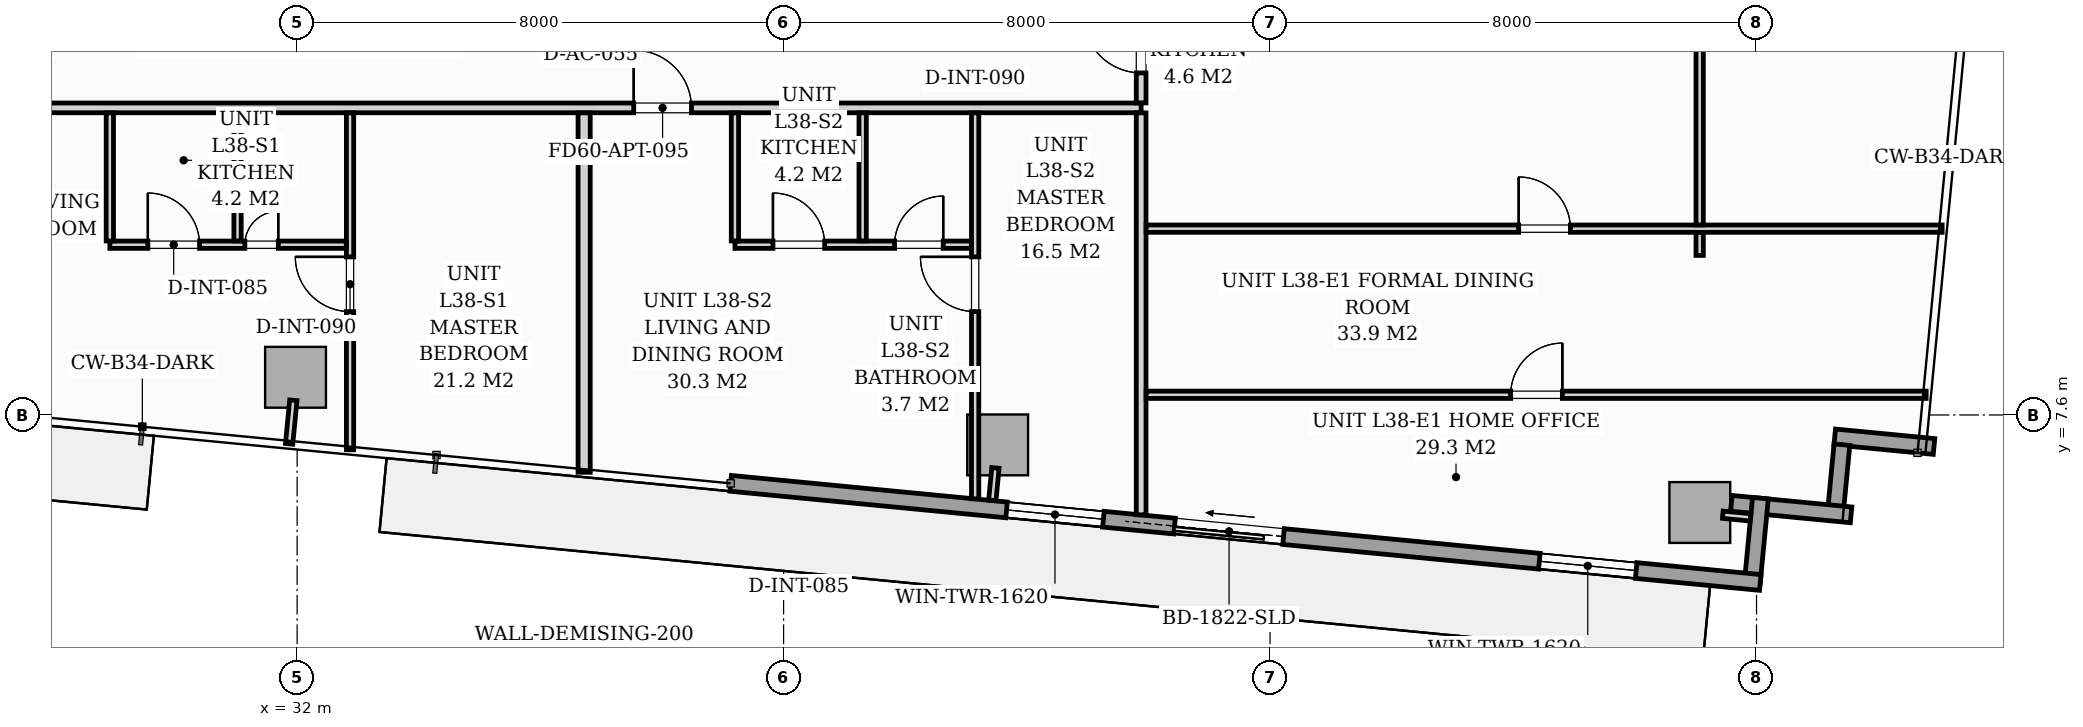
"""IFC4 building model, lengths in metres.
Left out: names, types, materials, properties, quantities, classifications, styles, units other than length and angle.
Written with IfcOpenShell. Run it as: python <this file> out.ifc"""

import sys

from ifc_helpers import new_model, si_unit, direction, frame, frame_2d, origin, origin_2d, place, context, subcontext, project, spatial, rectangle, extrude, source, transform, mapped, element, fill, save


model = new_model("IFC4")
c1 = context("Model", 3, precision=1e-05, world=origin(), true_north=direction((0.0, 1.0)))
c2 = subcontext(c1, "Body", "Model", "MODEL_VIEW")
j1 = project(units=[si_unit("LENGTHUNIT", "METRE"), si_unit("PLANEANGLEUNIT", "RADIAN")], contexts=[c1])
p1 = place(None, origin())
s1 = spatial("IfcSite", under=j1, at=p1, CompositionType="ELEMENT")
p2 = place(p1, origin())
s2 = spatial("IfcBuilding", under=s1, at=p2, CompositionType="ELEMENT")
p3 = place(p2, frame((0.0, 0.0, 134.2)))
s3 = spatial("IfcBuildingStorey", under=s2, at=p3, CompositionType="ELEMENT", Elevation=134.2)
m1 = source(origin(), c2, "Body", "SweptSolid", [
    extrude(rectangle(XDim=1.0, YDim=1.0, at=origin_2d()), origin(), (0.0, 0.0, 1.0), 3.196),
])
for number, where, z_axis, x_axis in (
    (1, (31.974, 8.22, 0.002), (0.0, 0.0, 1.0), (0.995, -0.096, 0.0)),
    (2, (43.521, 7.108, 0.002), (0.0, 0.0, 1.0), (0.995, -0.096, 0.0)),
    (3, (55.067, 5.996, 0.002), (0.0, 0.0, 1.0), (0.995, -0.096, 0.0)),
):
    element("IfcColumn", number, at=place(p3, frame(where, z_axis=z_axis, x_axis=x_axis)), inside=s3, PredefinedType="COLUMN", context=c2, shape_type="MappedRepresentation", body=[
        mapped(m1, transform((0.0, 0.0, 0.0), scale=1.0)),
    ])
p4 = place(p3, frame((58.919, 7.082, 0.0), z_axis=(0.0, 0.0, 1.0), x_axis=(-0.995393194909, 0.095876939504, 0.0)))
e4 = element("IfcWall", 4, at=p4, inside=s3, PredefinedType="STANDARD", context=c2, shape_type="SweptSolid", body=[
    extrude(rectangle(XDim=1.64, YDim=0.26, at=frame_2d((0.82, 0.0))), origin(), (0.0, 0.0, 1.0), 2.94),
])
p5 = place(p3, frame((57.405, 7.112, 0.0), z_axis=(0.0, 0.0, 1.0), x_axis=(-0.095971333708, -0.995384098279, 0.0)))
e5 = element("IfcWall", 5, at=p5, inside=s3, PredefinedType="STANDARD", context=c2, shape_type="SweptSolid", body=[
    extrude(rectangle(XDim=1.15, YDim=0.26, at=frame_2d((0.575, 0.0))), origin(), (0.0, 0.0, 1.0), 2.94),
])
p6 = place(p3, frame((57.555, 5.958, 0.0), z_axis=(0.0, 0.0, 1.0), x_axis=(-0.995401789159, 0.095787672171, 0.0)))
e6 = element("IfcWall", 6, at=p6, inside=s3, PredefinedType="STANDARD", context=c2, shape_type="SweptSolid", body=[
    extrude(rectangle(XDim=1.978, YDim=0.26, at=frame_2d((0.989, 0.0))), origin(), (0.0, 0.0, 1.0), 2.94),
])
p7 = place(p3, frame((56.064, 6.232, 0.0), z_axis=(0.0, 0.0, 1.0), x_axis=(-0.09589913835, -0.995391056452, 0.0)))
e7 = element("IfcWall", 7, at=p7, inside=s3, PredefinedType="STANDARD", context=c2, shape_type="SweptSolid", body=[
    extrude(rectangle(XDim=1.395, YDim=0.26, at=frame_2d((0.698, 0.0))), origin(), (0.0, 0.0, 1.0), 2.94),
])
p8 = place(p3, frame((56.061, 4.845, 0.0), z_axis=(0.0, 0.0, 1.0), x_axis=(-0.995395976631, 0.095848055311, 0.0)))
e8 = element("IfcWall", 8, at=p8, inside=s3, PredefinedType="STANDARD", context=c2, shape_type="SweptSolid", body=[
    extrude(rectangle(XDim=17.01, YDim=0.26, at=frame_2d((8.505, 0.0))), origin(), (0.0, 0.0, 1.0), 2.94),
])
p9 = place(p8, frame((7.876, 0.0, 0.0)))
e9 = element("IfcOpeningElement", 9, at=p9, cuts=e8, PredefinedType="OPENING", context=c2, shape_type="SweptSolid", body=[
    extrude(rectangle(XDim=1.8, YDim=2.06, at=frame_2d((0.9, 1.03))), frame((0.0, 0.14, 0.0), z_axis=(0.0, -1.0, 0.0), x_axis=(1.0, 0.0, 0.0)), (0.0, 0.0, 1.0), 0.28),
])
p10 = place(p8, frame((2.05, 0.0, 0.65)))
e10 = element("IfcOpeningElement", 10, at=p10, cuts=e8, PredefinedType="OPENING", context=c2, shape_type="SweptSolid", body=[
    extrude(rectangle(XDim=1.6, YDim=1.5, at=frame_2d((0.8, 0.75))), frame((0.0, 0.14, 0.0), z_axis=(0.0, -1.0, 0.0), x_axis=(1.0, 0.0, 0.0)), (0.0, 0.0, 1.0), 0.28),
])
p11 = place(p8, frame((10.852, 0.0, 0.75)))
e11 = element("IfcOpeningElement", 11, at=p11, cuts=e8, PredefinedType="OPENING", context=c2, shape_type="SweptSolid", body=[
    extrude(rectangle(XDim=1.6, YDim=1.5, at=frame_2d((0.8, 0.75))), frame((0.0, 0.14, 0.0), z_axis=(0.0, -1.0, 0.0), x_axis=(1.0, 0.0, 0.0)), (0.0, 0.0, 1.0), 0.28),
])
p12 = place(p3, frame((22.05, 12.65, 0.0), z_axis=(0.0, 0.0, 1.0), x_axis=(1.0, 0.0, 0.0)))
e12 = element("IfcWall", 12, at=p12, inside=s3, PredefinedType="PARTITIONING", context=c2, shape_type="SweptSolid", body=[
    extrude(rectangle(XDim=23.83, YDim=0.16, at=frame_2d((11.915, 0.0))), origin(), (0.0, 0.0, 1.0), 2.94),
])
p13 = place(p12, frame((3.0, 0.0, 0.0)))
e13 = element("IfcOpeningElement", 13, at=p13, cuts=e12, PredefinedType="OPENING", context=c2, shape_type="SweptSolid", body=[
    extrude(rectangle(XDim=0.95, YDim=2.06, at=frame_2d((0.475, 1.03))), frame((0.0, 0.09, 0.0), z_axis=(0.0, -1.0, 0.0), x_axis=(1.0, 0.0, 0.0)), (0.0, 0.0, 1.0), 0.18),
])
p14 = place(p12, frame((15.485, 0.0, 0.0)))
e14 = element("IfcOpeningElement", 14, at=p14, cuts=e12, PredefinedType="OPENING", context=c2, shape_type="SweptSolid", body=[
    extrude(rectangle(XDim=0.95, YDim=2.06, at=frame_2d((0.475, 1.03))), frame((0.0, 0.09, 0.0), z_axis=(0.0, -1.0, 0.0), x_axis=(1.0, 0.0, 0.0)), (0.0, 0.0, 1.0), 0.18),
])
p15 = place(p3, frame((45.88, 5.958, 0.0), z_axis=(0.0, 0.0, 1.0), x_axis=(0.0, 1.0, 0.0)))
e15 = element("IfcWall", 15, at=p15, inside=s3, PredefinedType="PARTITIONING", context=c2, shape_type="SweptSolid", body=[
    extrude(rectangle(XDim=6.61, YDim=0.16, at=frame_2d((3.305, 0.0))), origin(), (0.0, 0.0, 1.0), 2.94),
])
p16 = place(p3, frame((45.88, 12.732, 0.0), z_axis=(0.0, 0.0, 1.0), x_axis=(0.0, 1.0, 0.0)))
e16 = element("IfcWall", 16, at=p16, inside=s3, PredefinedType="PARTITIONING", context=c2, shape_type="SweptSolid", body=[
    extrude(rectangle(XDim=4.366, YDim=0.16, at=frame_2d((2.183, 0.0))), origin(), (0.0, 0.0, 1.0), 2.94),
])
p17 = place(p16, frame((0.493, 0.0, 0.0)))
e17 = element("IfcOpeningElement", 17, at=p17, cuts=e16, PredefinedType="OPENING", context=c2, shape_type="SweptSolid", body=[
    extrude(rectangle(XDim=0.95, YDim=2.06, at=frame_2d((0.475, 1.03))), frame((0.0, 0.09, 0.0), z_axis=(0.0, -1.0, 0.0), x_axis=(1.0, 0.0, 0.0)), (0.0, 0.0, 1.0), 0.18),
])
p18 = place(p3, frame((32.87, 7.028, 0.0), z_axis=(0.0, 0.0, 1.0), x_axis=(0.0, 1.0, 0.0)))
e18 = element("IfcWall", 18, at=p18, inside=s3, PredefinedType="PARTITIONING", context=c2, shape_type="SweptSolid", body=[
    extrude(rectangle(XDim=5.54, YDim=0.12, at=frame_2d((2.77, 0.0))), origin(), (0.0, 0.0, 1.0), 2.94),
])
p19 = place(p18, frame((2.272, 0.0, 0.0)))
e19 = element("IfcOpeningElement", 19, at=p19, cuts=e18, PredefinedType="OPENING", context=c2, shape_type="SweptSolid", body=[
    extrude(rectangle(XDim=0.9, YDim=2.05, at=frame_2d((0.45, 1.025))), frame((0.0, 0.07, 0.0), z_axis=(0.0, -1.0, 0.0), x_axis=(1.0, 0.0, 0.0)), (0.0, 0.0, 1.0), 0.14),
])
p20 = place(p3, frame((28.92, 10.4, 0.0), z_axis=(0.0, 0.0, 1.0), x_axis=(1.0, 0.0, 0.0)))
e20 = element("IfcWall", 20, at=p20, inside=s3, PredefinedType="PARTITIONING", context=c2, shape_type="SweptSolid", body=[
    extrude(rectangle(XDim=3.888, YDim=0.12, at=frame_2d((1.944, 0.0))), origin(), (0.0, 0.0, 1.0), 2.94),
])
p21 = place(p20, frame((0.625, 0.0, 0.0)))
e21 = element("IfcOpeningElement", 21, at=p21, cuts=e20, PredefinedType="OPENING", context=c2, shape_type="SweptSolid", body=[
    extrude(rectangle(XDim=0.85, YDim=2.05, at=frame_2d((0.425, 1.025))), frame((0.0, 0.07, 0.0), z_axis=(0.0, -1.0, 0.0), x_axis=(1.0, 0.0, 0.0)), (0.0, 0.0, 1.0), 0.14),
])
p22 = place(p20, frame((2.22, 0.0, 0.0)))
e22 = element("IfcOpeningElement", 22, at=p22, cuts=e20, PredefinedType="OPENING", context=c2, shape_type="SweptSolid", body=[
    extrude(rectangle(XDim=0.55, YDim=2.0, at=frame_2d((0.275, 1.0))), frame((0.0, 0.07, 0.0), z_axis=(0.0, -1.0, 0.0), x_axis=(1.0, 0.0, 0.0)), (0.0, 0.0, 1.0), 0.14),
])
for number, where, z_axis, x_axis in (
    (23, (31.02, 10.462, 0.0), (0.0, 0.0, 1.0), (0.0, 1.0, 0.0)),
    (24, (28.92, 10.462, 0.0), (0.0, 0.0, 1.0), (0.0, 1.0, 0.0)),
):
    element("IfcWall", number, at=place(p3, frame(where, z_axis=z_axis, x_axis=x_axis)), inside=s3, PredefinedType="PARTITIONING", context=c2, shape_type="SweptSolid", body=[
        extrude(rectangle(XDim=2.106, YDim=0.12, at=frame_2d((1.053, 0.0))), origin(), (0.0, 0.0, 1.0), 2.94),
    ])
p23 = place(p3, frame((36.72, 6.658, 0.0), z_axis=(0.0, 0.0, 1.0), x_axis=(0.0, 1.0, 0.0)))
e25 = element("IfcWall", 25, at=p23, inside=s3, PredefinedType="PARTITIONING", context=c2, shape_type="SweptSolid", body=[
    extrude(rectangle(XDim=5.91, YDim=0.2, at=frame_2d((2.955, 0.0))), origin(), (0.0, 0.0, 1.0), 2.94),
])
p24 = place(p3, frame((43.15, 6.221, 0.0), z_axis=(0.0, 0.0, 1.0), x_axis=(0.0, 1.0, 0.0)))
e26 = element("IfcWall", 26, at=p24, inside=s3, PredefinedType="PARTITIONING", context=c2, shape_type="SweptSolid", body=[
    extrude(rectangle(XDim=6.347, YDim=0.12, at=frame_2d((3.173, 0.0))), origin(), (0.0, 0.0, 1.0), 2.94),
])
p25 = place(p24, frame((3.079, 0.0, 0.0)))
e27 = element("IfcOpeningElement", 27, at=p25, cuts=e26, PredefinedType="OPENING", context=c2, shape_type="SweptSolid", body=[
    extrude(rectangle(XDim=0.9, YDim=2.05, at=frame_2d((0.45, 1.025))), frame((0.0, 0.07, 0.0), z_axis=(0.0, -1.0, 0.0), x_axis=(1.0, 0.0, 0.0)), (0.0, 0.0, 1.0), 0.14),
])
p26 = place(p3, frame((39.2, 10.4, 0.0), z_axis=(0.0, 0.0, 1.0), x_axis=(1.0, 0.0, 0.0)))
e28 = element("IfcWall", 28, at=p26, inside=s3, PredefinedType="PARTITIONING", context=c2, shape_type="SweptSolid", body=[
    extrude(rectangle(XDim=3.888, YDim=0.12, at=frame_2d((1.944, 0.0))), origin(), (0.0, 0.0, 1.0), 2.94),
])
p27 = place(p26, frame((0.625, 0.0, 0.0)))
e29 = element("IfcOpeningElement", 29, at=p27, cuts=e28, PredefinedType="OPENING", context=c2, shape_type="SweptSolid", body=[
    extrude(rectangle(XDim=0.85, YDim=2.05, at=frame_2d((0.425, 1.025))), frame((0.0, 0.07, 0.0), z_axis=(0.0, -1.0, 0.0), x_axis=(1.0, 0.0, 0.0)), (0.0, 0.0, 1.0), 0.14),
])
p28 = place(p26, frame((2.625, 0.0, 0.0)))
e30 = element("IfcOpeningElement", 30, at=p28, cuts=e28, PredefinedType="OPENING", context=c2, shape_type="SweptSolid", body=[
    extrude(rectangle(XDim=0.8, YDim=2.02, at=frame_2d((0.4, 1.01))), frame((0.0, 0.07, 0.0), z_axis=(0.0, -1.0, 0.0), x_axis=(1.0, 0.0, 0.0)), (0.0, 0.0, 1.0), 0.14),
])
for number, where, z_axis, x_axis in (
    (31, (41.3, 10.462, 0.0), (0.0, 0.0, 1.0), (0.0, 1.0, 0.0)),
    (32, (39.2, 10.462, 0.0), (0.0, 0.0, 1.0), (0.0, 1.0, 0.0)),
):
    element("IfcWall", number, at=place(p3, frame(where, z_axis=z_axis, x_axis=x_axis)), inside=s3, PredefinedType="PARTITIONING", context=c2, shape_type="SweptSolid", body=[
        extrude(rectangle(XDim=2.106, YDim=0.12, at=frame_2d((1.053, 0.0))), origin(), (0.0, 0.0, 1.0), 2.94),
    ])
p29 = place(p3, frame((45.962, 7.932, 0.0), z_axis=(0.0, 0.0, 1.0), x_axis=(1.0, 0.0, 0.0)))
e33 = element("IfcWall", 33, at=p29, inside=s3, PredefinedType="PARTITIONING", context=c2, shape_type="SweptSolid", body=[
    extrude(rectangle(XDim=12.828, YDim=0.12, at=frame_2d((6.414, 0.0))), origin(), (0.0, 0.0, 1.0), 2.94),
])
p30 = place(p29, frame((5.995, 0.0, 0.0)))
e34 = element("IfcOpeningElement", 34, at=p30, cuts=e33, PredefinedType="OPENING", context=c2, shape_type="SweptSolid", body=[
    extrude(rectangle(XDim=0.85, YDim=2.05, at=frame_2d((0.425, 1.025))), frame((0.0, 0.07, 0.0), z_axis=(0.0, -1.0, 0.0), x_axis=(1.0, 0.0, 0.0)), (0.0, 0.0, 1.0), 0.14),
])
p31 = place(p3, frame((45.962, 10.664, 0.0), z_axis=(0.0, 0.0, 1.0), x_axis=(1.0, 0.0, 0.0)))
e35 = element("IfcWall", 35, at=p31, inside=s3, PredefinedType="PARTITIONING", context=c2, shape_type="SweptSolid", body=[
    extrude(rectangle(XDim=13.091, YDim=0.12, at=frame_2d((6.545, 0.0))), origin(), (0.0, 0.0, 1.0), 2.94),
])
p32 = place(p31, frame((6.127, 0.0, 0.0)))
e36 = element("IfcOpeningElement", 36, at=p32, cuts=e35, PredefinedType="OPENING", context=c2, shape_type="SweptSolid", body=[
    extrude(rectangle(XDim=0.85, YDim=2.05, at=frame_2d((0.425, 1.025))), frame((0.0, 0.07, 0.0), z_axis=(0.0, -1.0, 0.0), x_axis=(1.0, 0.0, 0.0)), (0.0, 0.0, 1.0), 0.14),
])
p33 = place(p3, frame((55.065, 10.224, 0.0), z_axis=(0.0, 0.0, 1.0), x_axis=(0.0, 1.0, 0.0)))
e37 = element("IfcWall", 37, at=p33, inside=s3, PredefinedType="PARTITIONING", context=c2, shape_type="SweptSolid", body=[
    extrude(rectangle(XDim=0.378, YDim=0.12, at=frame_2d((0.189, 0.0))), origin(), (0.0, 0.0, 1.0), 2.94),
])
p34 = place(p3, frame((55.065, 10.726, 0.0), z_axis=(0.0, 0.0, 1.0), x_axis=(0.0, 1.0, 0.0)))
e38 = element("IfcWall", 38, at=p34, inside=s3, PredefinedType="PARTITIONING", context=c2, shape_type="SweptSolid", body=[
    extrude(rectangle(XDim=9.348, YDim=0.12, at=frame_2d((4.674, 0.0))), origin(), (0.0, 0.0, 1.0), 2.94),
])
p35 = place(p34, frame((4.249, 0.0, 0.0)))
e39 = element("IfcOpeningElement", 39, at=p35, cuts=e38, PredefinedType="OPENING", context=c2, shape_type="SweptSolid", body=[
    extrude(rectangle(XDim=0.85, YDim=2.05, at=frame_2d((0.425, 1.025))), frame((0.0, 0.07, 0.0), z_axis=(0.0, -1.0, 0.0), x_axis=(1.0, 0.0, 0.0)), (0.0, 0.0, 1.0), 0.14),
])
p36 = place(p3, frame((31.938, 7.841, 0.0), z_axis=(0.0, 0.0, 1.0), x_axis=(-0.095977354523, -0.995383517755, 0.0)))
e40 = element("IfcWall", 40, at=p36, inside=s3, PredefinedType="PARTITIONING", context=c2, shape_type="SweptSolid", body=[
    extrude(rectangle(XDim=0.72, YDim=0.12, at=frame_2d((0.36, 0.0))), origin(), (0.0, 0.0, 1.0), 2.94),
])
p37 = place(p3, frame((43.484, 6.729, 0.0), z_axis=(0.0, 0.0, 1.0), x_axis=(-0.095772948675, -0.995403205893, 0.0)))
e41 = element("IfcWall", 41, at=p37, inside=s3, PredefinedType="PARTITIONING", context=c2, shape_type="SweptSolid", body=[
    extrude(rectangle(XDim=0.538, YDim=0.12, at=frame_2d((0.269, 0.0))), origin(), (0.0, 0.0, 1.0), 2.94),
])
p38 = place(p3, frame((55.445, 5.96, 0.0), z_axis=(0.0, 0.0, 1.0), x_axis=(0.995384576284, -0.09596637586, 0.0)))
e42 = element("IfcWall", 42, at=p38, inside=s3, PredefinedType="PARTITIONING", context=c2, shape_type="SweptSolid", body=[
    extrude(rectangle(XDim=0.458, YDim=0.12, at=frame_2d((0.229, 0.0))), origin(), (0.0, 0.0, 1.0), 2.94),
])
m2 = source(origin(), c2, "Body", "SweptSolid", [
    extrude(rectangle(XDim=1.8, YDim=2.06, at=frame_2d((0.9, 1.03))), frame((0.0, 0.025, 0.0), z_axis=(0.0, -1.0, 0.0), x_axis=(1.0, 0.0, 0.0)), (0.0, 0.0, 1.0), 0.05),
])
p39 = place(p9, origin())
e43 = element("IfcDoor", 43, at=p39, inside=s3, OperationType="SLIDING_TO_RIGHT", PredefinedType="DOOR", context=c2, shape_type="MappedRepresentation", body=[
    mapped(m2, transform((0.0, 0.0, 0.0), scale=1.0)),
])
fill(e9, e43)
m3 = source(origin(), c2, "Body", "SweptSolid", [
    extrude(rectangle(XDim=1.6, YDim=1.5, at=frame_2d((0.8, 0.75))), frame((0.0, 0.03, 0.0), z_axis=(0.0, -1.0, 0.0), x_axis=(1.0, 0.0, 0.0)), (0.0, 0.0, 1.0), 0.06),
])
p40 = place(p10, origin())
e44 = element("IfcWindow", 44, at=p40, inside=s3, PartitioningType="SINGLE_PANEL", PredefinedType="WINDOW", context=c2, shape_type="MappedRepresentation", body=[
    mapped(m3, transform((0.0, 0.0, 0.0), scale=1.0)),
])
fill(e10, e44)
p41 = place(p11, origin())
e45 = element("IfcWindow", 45, at=p41, inside=s3, PartitioningType="SINGLE_PANEL", PredefinedType="WINDOW", context=c2, shape_type="MappedRepresentation", body=[
    mapped(m3, transform((0.0, 0.0, 0.0), scale=1.0)),
])
fill(e11, e45)
m4 = source(origin(), c2, "Body", "SweptSolid", [
    extrude(rectangle(XDim=0.9, YDim=2.05, at=frame_2d((0.45, 1.025))), frame((0.0, 0.025, 0.0), z_axis=(0.0, -1.0, 0.0), x_axis=(1.0, 0.0, 0.0)), (0.0, 0.0, 1.0), 0.05),
])
p42 = place(p19, origin())
e46 = element("IfcDoor", 46, at=p42, inside=s3, OperationType="SINGLE_SWING_RIGHT", PredefinedType="DOOR", context=c2, shape_type="MappedRepresentation", body=[
    mapped(m4, transform((0.0, 0.0, 0.0), scale=1.0)),
])
fill(e19, e46)
m5 = source(origin(), c2, "Body", "SweptSolid", [
    extrude(rectangle(XDim=0.85, YDim=2.05, at=frame_2d((0.425, 1.025))), frame((0.0, 0.025, 0.0), z_axis=(0.0, -1.0, 0.0), x_axis=(1.0, 0.0, 0.0)), (0.0, 0.0, 1.0), 0.05),
])
p43 = place(p21, origin())
e47 = element("IfcDoor", 47, at=p43, inside=s3, OperationType="SINGLE_SWING_LEFT", PredefinedType="DOOR", context=c2, shape_type="MappedRepresentation", body=[
    mapped(m5, transform((0.0, 0.0, 0.0), scale=1.0)),
])
fill(e21, e47)
m6 = source(origin(), c2, "Body", "SweptSolid", [
    extrude(rectangle(XDim=0.55, YDim=2.0, at=frame_2d((0.275, 1.0))), frame((0.0, 0.025, 0.0), z_axis=(0.0, -1.0, 0.0), x_axis=(1.0, 0.0, 0.0)), (0.0, 0.0, 1.0), 0.05),
])
p44 = place(p22, origin())
e48 = element("IfcDoor", 48, at=p44, inside=s3, OperationType="SINGLE_SWING_RIGHT", PredefinedType="DOOR", context=c2, shape_type="MappedRepresentation", body=[
    mapped(m6, transform((0.0, 0.0, 0.0), scale=1.0)),
])
fill(e22, e48)
m7 = source(origin(), c2, "Body", "SweptSolid", [
    extrude(rectangle(XDim=0.95, YDim=2.06, at=frame_2d((0.475, 1.03))), frame((0.0, 0.025, 0.0), z_axis=(0.0, -1.0, 0.0), x_axis=(1.0, 0.0, 0.0)), (0.0, 0.0, 1.0), 0.05),
])
p45 = place(p14, origin())
e49 = element("IfcDoor", 49, at=p45, inside=s3, OperationType="SINGLE_SWING_LEFT", PredefinedType="DOOR", context=c2, shape_type="MappedRepresentation", body=[
    mapped(m7, transform((0.0, 0.0, 0.0), scale=1.0)),
])
fill(e14, e49)
p46 = place(p25, origin())
e50 = element("IfcDoor", 50, at=p46, inside=s3, OperationType="SINGLE_SWING_RIGHT", PredefinedType="DOOR", context=c2, shape_type="MappedRepresentation", body=[
    mapped(m4, transform((0.0, 0.0, 0.0), scale=1.0)),
])
fill(e27, e50)
p47 = place(p27, origin())
e51 = element("IfcDoor", 51, at=p47, inside=s3, OperationType="SINGLE_SWING_LEFT", PredefinedType="DOOR", context=c2, shape_type="MappedRepresentation", body=[
    mapped(m5, transform((0.0, 0.0, 0.0), scale=1.0)),
])
fill(e29, e51)
m8 = source(origin(), c2, "Body", "SweptSolid", [
    extrude(rectangle(XDim=0.8, YDim=2.02, at=frame_2d((0.4, 1.01))), frame((0.0, 0.025, 0.0), z_axis=(0.0, -1.0, 0.0), x_axis=(1.0, 0.0, 0.0)), (0.0, 0.0, 1.0), 0.05),
])
p48 = place(p28, origin())
e52 = element("IfcDoor", 52, at=p48, inside=s3, OperationType="SINGLE_SWING_RIGHT", PredefinedType="DOOR", context=c2, shape_type="MappedRepresentation", body=[
    mapped(m8, transform((0.0, 0.0, 0.0), scale=1.0)),
])
fill(e30, e52)
p49 = place(p17, origin())
e53 = element("IfcDoor", 53, at=p49, inside=s3, OperationType="SINGLE_SWING_RIGHT", PredefinedType="DOOR", context=c2, shape_type="MappedRepresentation", body=[
    mapped(m7, transform((0.0, 0.0, 0.0), scale=1.0)),
])
fill(e17, e53)
p50 = place(p30, origin())
e54 = element("IfcDoor", 54, at=p50, inside=s3, OperationType="SINGLE_SWING_RIGHT", PredefinedType="DOOR", context=c2, shape_type="MappedRepresentation", body=[
    mapped(m5, transform((0.0, 0.0, 0.0), scale=1.0)),
])
fill(e34, e54)
p51 = place(p32, origin())
e55 = element("IfcDoor", 55, at=p51, inside=s3, OperationType="SINGLE_SWING_LEFT", PredefinedType="DOOR", context=c2, shape_type="MappedRepresentation", body=[
    mapped(m5, transform((0.0, 0.0, 0.0), scale=1.0)),
])
fill(e36, e55)
save(model, sys.argv[1])
